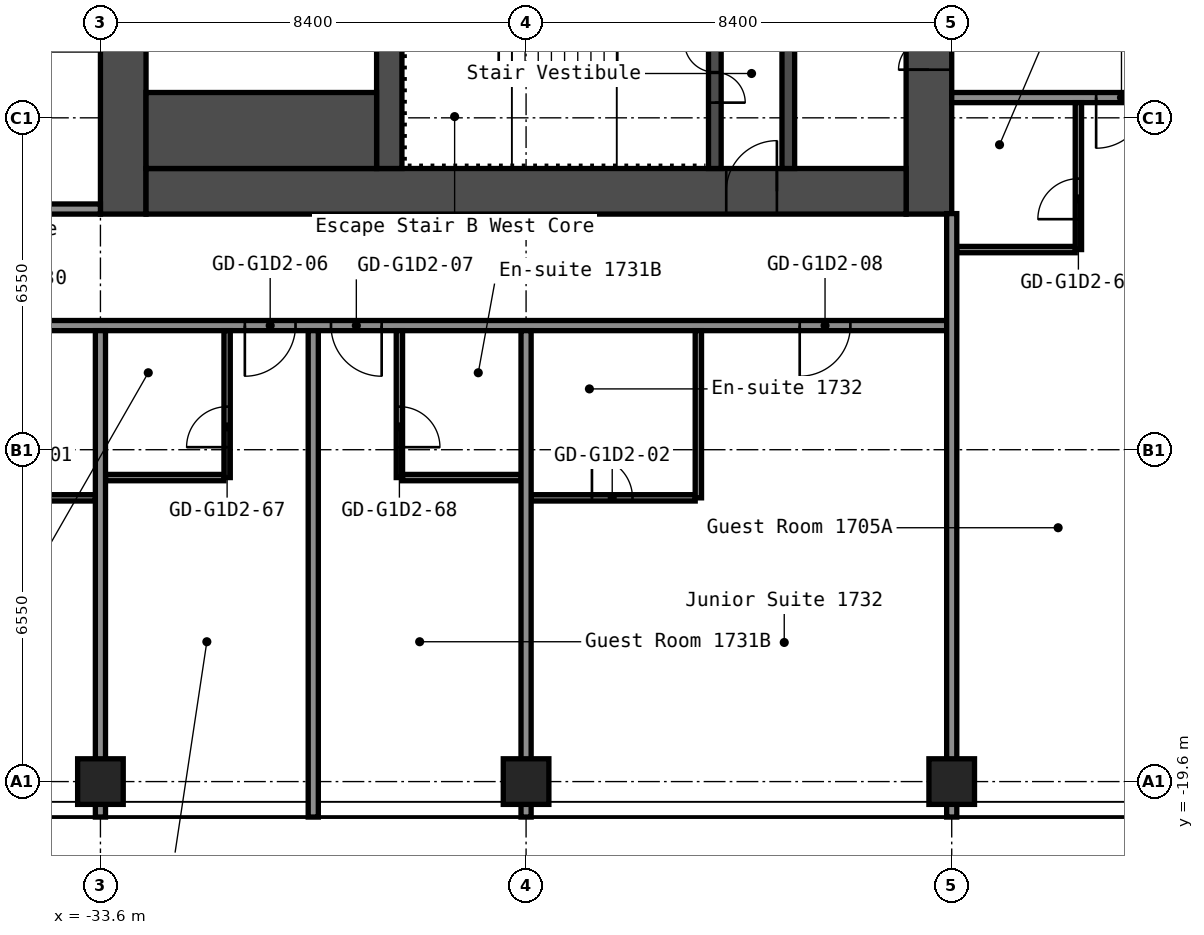
"""IFC4 building model, lengths in metres.
Left out: names, types, materials, properties, quantities, classifications, styles, units other than length and angle.
Written with IfcOpenShell. Run it as: python <this file> out.ifc"""

import sys

from ifc_helpers import new_model, si_unit, direction, frame, frame_2d, origin, origin_2d, place, context, subcontext, project, spatial, rectangle, hollow_rectangle, extrude, element, fill, save


model = new_model("IFC4")
c1 = context("Model", 3, precision=1e-05, world=origin(), true_north=direction((0.0, 1.0)))
c2 = subcontext(c1, "Body", "Model", "MODEL_VIEW")
j1 = project(units=[si_unit("LENGTHUNIT", "METRE"), si_unit("PLANEANGLEUNIT", "RADIAN")], contexts=[c1])
p1 = place(None, origin())
s1 = spatial("IfcSite", under=j1, at=p1, CompositionType="ELEMENT")
p2 = place(p1, origin())
s2 = spatial("IfcBuilding", under=s1, at=p2, CompositionType="ELEMENT")
p3 = place(p2, frame((0.0, 0.0, 61.4)))
s3 = spatial("IfcBuildingStorey", under=s2, at=p3, CompositionType="ELEMENT", Elevation=61.4)
for number, where, z_axis, x_axis in (
    (1, (-33.6, -19.6, 0.0), (0.0, 0.0, 1.0), (1.0, 0.0, 0.0)),
    (2, (-25.2, -19.6, 0.0), (0.0, 0.0, 1.0), (1.0, 0.0, 0.0)),
    (3, (-16.8, -19.6, 0.0), (0.0, 0.0, 1.0), (1.0, 0.0, 0.0)),
):
    element("IfcColumn", number, at=place(p3, frame(where, z_axis=z_axis, x_axis=x_axis)), inside=s3, PredefinedType="COLUMN", context=c2, shape_type="SweptSolid", body=[
        extrude(hollow_rectangle(XDim=0.9, YDim=0.9, WallThickness=0.036, at=origin_2d()), origin(), (0.0, 0.0, 1.0), 2.9),
    ])
p4 = place(p3, frame((-17.25, -8.4, 0.0), z_axis=(0.0, 0.0, 1.0), x_axis=(0.0, 1.0, 0.0)))
e4 = element("IfcWall", 4, at=p4, inside=s3, PredefinedType="SHEAR", context=c2, shape_type="SweptSolid", body=[
    extrude(rectangle(XDim=16.8, YDim=0.9, at=frame_2d((8.4, 0.0))), origin(), (0.0, 0.0, 1.0), 2.9),
])
p5 = place(p4, frame((12.75, 0.0, 0.0)))
e5 = element("IfcOpeningElement", 5, at=p5, cuts=e4, PredefinedType="OPENING", context=c2, shape_type="SweptSolid", body=[
    extrude(rectangle(XDim=1.2, YDim=2.1, at=frame_2d((0.6, 1.05))), frame((0.0, 0.46, 0.0), z_axis=(0.0, -1.0, 0.0), x_axis=(1.0, 0.0, 0.0)), (0.0, 0.0, 1.0), 0.92),
])
p6 = place(p4, frame((2.85, 0.0, 0.0)))
e6 = element("IfcOpeningElement", 6, at=p6, cuts=e4, PredefinedType="OPENING", context=c2, shape_type="SweptSolid", body=[
    extrude(rectangle(XDim=1.2, YDim=2.1, at=frame_2d((0.6, 1.05))), frame((0.0, 0.46, 0.0), z_axis=(0.0, -1.0, 0.0), x_axis=(1.0, 0.0, 0.0)), (0.0, 0.0, 1.0), 0.92),
])
p7 = place(p3, frame((-33.15, -8.4, 0.0), z_axis=(0.0, 0.0, 1.0), x_axis=(0.0, 1.0, 0.0)))
e7 = element("IfcWall", 7, at=p7, inside=s3, PredefinedType="SHEAR", context=c2, shape_type="SweptSolid", body=[
    extrude(rectangle(XDim=16.8, YDim=0.9, at=frame_2d((8.4, 0.0))), origin(), (0.0, 0.0, 1.0), 2.9),
])
p8 = place(p3, frame((-32.7, -7.95, 0.0), z_axis=(0.0, 0.0, 1.0), x_axis=(1.0, 0.0, 0.0)))
e8 = element("IfcWall", 8, at=p8, inside=s3, PredefinedType="SHEAR", context=c2, shape_type="SweptSolid", body=[
    extrude(rectangle(XDim=15.0, YDim=0.9, at=frame_2d((7.5, 0.0))), origin(), (0.0, 0.0, 1.0), 2.9),
])
p9 = place(p8, frame((11.45, 0.0, 0.0)))
e9 = element("IfcOpeningElement", 9, at=p9, cuts=e8, PredefinedType="OPENING", context=c2, shape_type="SweptSolid", body=[
    extrude(rectangle(XDim=1.0, YDim=2.1, at=frame_2d((0.5, 1.05))), frame((0.0, 0.46, 0.0), z_axis=(0.0, -1.0, 0.0), x_axis=(1.0, 0.0, 0.0)), (0.0, 0.0, 1.0), 0.92),
])
p10 = place(p3, frame((-20.025, -7.5, 0.0), z_axis=(0.0, 0.0, 1.0), x_axis=(0.0, 1.0, 0.0)))
e10 = element("IfcWall", 10, at=p10, inside=s3, PredefinedType="SHEAR", context=c2, shape_type="SweptSolid", body=[
    extrude(rectangle(XDim=6.3, YDim=0.25, at=frame_2d((3.15, 0.0))), origin(), (0.0, 0.0, 1.0), 2.9),
])
p11 = place(p10, frame((2.4, 0.0, 0.0)))
e11 = element("IfcOpeningElement", 11, at=p11, cuts=e10, PredefinedType="OPENING", context=c2, shape_type="SweptSolid", body=[
    extrude(rectangle(XDim=1.0, YDim=2.1, at=frame_2d((0.5, 1.05))), frame((0.0, 0.135, 0.0), z_axis=(0.0, -1.0, 0.0), x_axis=(1.0, 0.0, 0.0)), (0.0, 0.0, 1.0), 0.27),
])
p12 = place(p3, frame((-21.475, -7.5, 0.0), z_axis=(0.0, 0.0, 1.0), x_axis=(0.0, 1.0, 0.0)))
e12 = element("IfcWall", 12, at=p12, inside=s3, PredefinedType="SHEAR", context=c2, shape_type="SweptSolid", body=[
    extrude(rectangle(XDim=3.75, YDim=0.25, at=frame_2d((1.875, 0.0))), origin(), (0.0, 0.0, 1.0), 2.9),
])
p13 = place(p12, frame((1.3, 0.0, 0.0)))
e13 = element("IfcOpeningElement", 13, at=p13, cuts=e12, PredefinedType="OPENING", context=c2, shape_type="SweptSolid", body=[
    extrude(rectangle(XDim=1.2, YDim=2.1, at=frame_2d((0.6, 1.05))), frame((0.0, 0.135, 0.0), z_axis=(0.0, -1.0, 0.0), x_axis=(1.0, 0.0, 0.0)), (0.0, 0.0, 1.0), 0.27),
])
p14 = place(p3, frame((-27.9, -7.5, 0.0), z_axis=(0.0, 0.0, 1.0), x_axis=(0.0, 1.0, 0.0)))
e14 = element("IfcWall", 14, at=p14, inside=s3, PredefinedType="SHEAR", context=c2, shape_type="SweptSolid", body=[
    extrude(rectangle(XDim=3.75, YDim=0.5, at=frame_2d((1.875, 0.0))), origin(), (0.0, 0.0, 1.0), 2.9),
])
p15 = place(p3, frame((-32.7, -6.75, 0.0), z_axis=(0.0, 0.0, 1.0), x_axis=(1.0, 0.0, 0.0)))
e15 = element("IfcWall", 15, at=p15, inside=s3, PredefinedType="SHEAR", context=c2, shape_type="SweptSolid", body=[
    extrude(rectangle(XDim=4.55, YDim=1.5, at=frame_2d((2.275, 0.0))), origin(), (0.0, 0.0, 1.0), 2.9),
])
p16 = place(p3, frame((-36.938, -14.0, 0.0), z_axis=(0.0, 0.0, 1.0), x_axis=(1.0, 0.0, 0.0)))
e16 = element("IfcWall", 16, at=p16, inside=s3, PredefinedType="PARTITIONING", context=c2, shape_type="SweptSolid", body=[
    extrude(rectangle(XDim=3.238, YDim=0.125, at=frame_2d((1.619, 0.0))), origin(), (0.0, 0.0, 1.0), 2.9),
])
p17 = place(p16, frame((1.238, 0.0, 0.0)))
e17 = element("IfcOpeningElement", 17, at=p17, cuts=e16, PredefinedType="OPENING", context=c2, shape_type="SweptSolid", body=[
    extrude(rectangle(XDim=0.8, YDim=2.1, at=frame_2d((0.4, 1.05))), frame((0.0, 0.073, 0.0), z_axis=(0.0, -1.0, 0.0), x_axis=(1.0, 0.0, 0.0)), (0.0, 0.0, 1.0), 0.145),
])
p18 = place(p3, frame((-25.1, -14.0, 0.0), z_axis=(0.0, 0.0, 1.0), x_axis=(1.0, 0.0, 0.0)))
e18 = element("IfcWall", 18, at=p18, inside=s3, PredefinedType="PARTITIONING", context=c2, shape_type="SweptSolid", body=[
    extrude(rectangle(XDim=3.238, YDim=0.125, at=frame_2d((1.619, 0.0))), origin(), (0.0, 0.0, 1.0), 2.9),
])
p19 = place(p18, frame((1.2, 0.0, 0.0)))
e19 = element("IfcOpeningElement", 19, at=p19, cuts=e18, PredefinedType="OPENING", context=c2, shape_type="SweptSolid", body=[
    extrude(rectangle(XDim=0.8, YDim=2.1, at=frame_2d((0.4, 1.05))), frame((0.0, 0.073, 0.0), z_axis=(0.0, -1.0, 0.0), x_axis=(1.0, 0.0, 0.0)), (0.0, 0.0, 1.0), 0.145),
])
for number, where, z_axis, x_axis in (
    (20, (-33.5, -13.6, 0.0), (0.0, 0.0, 1.0), (1.0, 0.0, 0.0)),
    (21, (-27.637, -13.6, 0.0), (0.0, 0.0, 1.0), (1.0, 0.0, 0.0)),
):
    element("IfcWall", number, at=place(p3, frame(where, z_axis=z_axis, x_axis=x_axis)), inside=s3, PredefinedType="PARTITIONING", context=c2, shape_type="SweptSolid", body=[
        extrude(rectangle(XDim=2.337, YDim=0.125, at=frame_2d((1.169, 0.0))), origin(), (0.0, 0.0, 1.0), 2.9),
    ])
p20 = place(p3, frame((-51.1, -10.6, 0.0), z_axis=(0.0, 0.0, 1.0), x_axis=(1.0, 0.0, 0.0)))
e22 = element("IfcWall", 22, at=p20, inside=s3, PredefinedType="PARTITIONING", context=c2, shape_type="SweptSolid", body=[
    extrude(rectangle(XDim=34.3, YDim=0.2, at=frame_2d((17.15, 0.0))), origin(), (0.0, 0.0, 1.0), 2.9),
])
p21 = place(p20, frame((3.25, 0.0, 0.0)))
e23 = element("IfcOpeningElement", 23, at=p21, cuts=e22, PredefinedType="OPENING", context=c2, shape_type="SweptSolid", body=[
    extrude(rectangle(XDim=1.0, YDim=2.1, at=frame_2d((0.5, 1.05))), frame((0.0, 0.11, 0.0), z_axis=(0.0, -1.0, 0.0), x_axis=(1.0, 0.0, 0.0)), (0.0, 0.0, 1.0), 0.22),
])
p22 = place(p20, frame((5.15, 0.0, 0.0)))
e24 = element("IfcOpeningElement", 24, at=p22, cuts=e22, PredefinedType="OPENING", context=c2, shape_type="SweptSolid", body=[
    extrude(rectangle(XDim=1.0, YDim=2.1, at=frame_2d((0.5, 1.05))), frame((0.0, 0.11, 0.0), z_axis=(0.0, -1.0, 0.0), x_axis=(1.0, 0.0, 0.0)), (0.0, 0.0, 1.0), 0.22),
])
p23 = place(p20, frame((11.1, 0.0, 0.0)))
e25 = element("IfcOpeningElement", 25, at=p23, cuts=e22, PredefinedType="OPENING", context=c2, shape_type="SweptSolid", body=[
    extrude(rectangle(XDim=1.0, YDim=2.1, at=frame_2d((0.5, 1.05))), frame((0.0, 0.11, 0.0), z_axis=(0.0, -1.0, 0.0), x_axis=(1.0, 0.0, 0.0)), (0.0, 0.0, 1.0), 0.22),
])
p24 = place(p20, frame((20.35, 0.0, 0.0)))
e26 = element("IfcOpeningElement", 26, at=p24, cuts=e22, PredefinedType="OPENING", context=c2, shape_type="SweptSolid", body=[
    extrude(rectangle(XDim=1.0, YDim=2.1, at=frame_2d((0.5, 1.05))), frame((0.0, 0.11, 0.0), z_axis=(0.0, -1.0, 0.0), x_axis=(1.0, 0.0, 0.0)), (0.0, 0.0, 1.0), 0.22),
])
p25 = place(p20, frame((22.05, 0.0, 0.0)))
e27 = element("IfcOpeningElement", 27, at=p25, cuts=e22, PredefinedType="OPENING", context=c2, shape_type="SweptSolid", body=[
    extrude(rectangle(XDim=1.0, YDim=2.1, at=frame_2d((0.5, 1.05))), frame((0.0, 0.11, 0.0), z_axis=(0.0, -1.0, 0.0), x_axis=(1.0, 0.0, 0.0)), (0.0, 0.0, 1.0), 0.22),
])
p26 = place(p20, frame((31.3, 0.0, 0.0)))
e28 = element("IfcOpeningElement", 28, at=p26, cuts=e22, PredefinedType="OPENING", context=c2, shape_type="SweptSolid", body=[
    extrude(rectangle(XDim=1.0, YDim=2.1, at=frame_2d((0.5, 1.05))), frame((0.0, 0.11, 0.0), z_axis=(0.0, -1.0, 0.0), x_axis=(1.0, 0.0, 0.0)), (0.0, 0.0, 1.0), 0.22),
])
p27 = place(p3, frame((-16.7, -9.1, 0.0), z_axis=(0.0, 0.0, 1.0), x_axis=(1.0, 0.0, 0.0)))
e29 = element("IfcWall", 29, at=p27, inside=s3, PredefinedType="PARTITIONING", context=c2, shape_type="SweptSolid", body=[
    extrude(rectangle(XDim=2.337, YDim=0.125, at=frame_2d((1.169, 0.0))), origin(), (0.0, 0.0, 1.0), 2.9),
])
p28 = place(p3, frame((-48.6, -8.3, 0.0), z_axis=(0.0, 0.0, 1.0), x_axis=(1.0, 0.0, 0.0)))
e30 = element("IfcWall", 30, at=p28, inside=s3, PredefinedType="PARTITIONING", context=c2, shape_type="SweptSolid", body=[
    extrude(rectangle(XDim=15.0, YDim=0.2, at=frame_2d((7.5, 0.0))), origin(), (0.0, 0.0, 1.0), 2.9),
])
p29 = place(p28, frame((1.1, 0.0, 0.0)))
e31 = element("IfcOpeningElement", 31, at=p29, cuts=e30, PredefinedType="OPENING", context=c2, shape_type="SweptSolid", body=[
    extrude(rectangle(XDim=1.0, YDim=2.1, at=frame_2d((0.5, 1.05))), frame((0.0, 0.11, 0.0), z_axis=(0.0, -1.0, 0.0), x_axis=(1.0, 0.0, 0.0)), (0.0, 0.0, 1.0), 0.22),
])
p30 = place(p28, frame((8.2, 0.0, 0.0)))
e32 = element("IfcOpeningElement", 32, at=p30, cuts=e30, PredefinedType="OPENING", context=c2, shape_type="SweptSolid", body=[
    extrude(rectangle(XDim=1.0, YDim=2.1, at=frame_2d((0.5, 1.05))), frame((0.0, 0.11, 0.0), z_axis=(0.0, -1.0, 0.0), x_axis=(1.0, 0.0, 0.0)), (0.0, 0.0, 1.0), 0.22),
])
p31 = place(p3, frame((-16.8, -6.1, 0.0), z_axis=(0.0, 0.0, 1.0), x_axis=(1.0, 0.0, 0.0)))
e33 = element("IfcWall", 33, at=p31, inside=s3, PredefinedType="PARTITIONING", context=c2, shape_type="SweptSolid", body=[
    extrude(rectangle(XDim=33.6, YDim=0.2, at=frame_2d((16.8, 0.0))), origin(), (0.0, 0.0, 1.0), 2.9),
])
p32 = place(p31, frame((2.85, 0.0, 0.0)))
e34 = element("IfcOpeningElement", 34, at=p32, cuts=e33, PredefinedType="OPENING", context=c2, shape_type="SweptSolid", body=[
    extrude(rectangle(XDim=1.0, YDim=2.1, at=frame_2d((0.5, 1.05))), frame((0.0, 0.11, 0.0), z_axis=(0.0, -1.0, 0.0), x_axis=(1.0, 0.0, 0.0)), (0.0, 0.0, 1.0), 0.22),
])
p33 = place(p31, frame((4.55, 0.0, 0.0)))
e35 = element("IfcOpeningElement", 35, at=p33, cuts=e33, PredefinedType="OPENING", context=c2, shape_type="SweptSolid", body=[
    extrude(rectangle(XDim=1.0, YDim=2.1, at=frame_2d((0.5, 1.05))), frame((0.0, 0.11, 0.0), z_axis=(0.0, -1.0, 0.0), x_axis=(1.0, 0.0, 0.0)), (0.0, 0.0, 1.0), 0.22),
])
p34 = place(p31, frame((12.1, 0.0, 0.0)))
e36 = element("IfcOpeningElement", 36, at=p34, cuts=e33, PredefinedType="OPENING", context=c2, shape_type="SweptSolid", body=[
    extrude(rectangle(XDim=1.0, YDim=2.1, at=frame_2d((0.5, 1.05))), frame((0.0, 0.11, 0.0), z_axis=(0.0, -1.0, 0.0), x_axis=(1.0, 0.0, 0.0)), (0.0, 0.0, 1.0), 0.22),
])
p35 = place(p31, frame((19.65, 0.0, 0.0)))
e37 = element("IfcOpeningElement", 37, at=p35, cuts=e33, PredefinedType="OPENING", context=c2, shape_type="SweptSolid", body=[
    extrude(rectangle(XDim=1.0, YDim=2.1, at=frame_2d((0.5, 1.05))), frame((0.0, 0.11, 0.0), z_axis=(0.0, -1.0, 0.0), x_axis=(1.0, 0.0, 0.0)), (0.0, 0.0, 1.0), 0.22),
])
p36 = place(p31, frame((21.35, 0.0, 0.0)))
e38 = element("IfcOpeningElement", 38, at=p36, cuts=e33, PredefinedType="OPENING", context=c2, shape_type="SweptSolid", body=[
    extrude(rectangle(XDim=1.0, YDim=2.1, at=frame_2d((0.5, 1.05))), frame((0.0, 0.11, 0.0), z_axis=(0.0, -1.0, 0.0), x_axis=(1.0, 0.0, 0.0)), (0.0, 0.0, 1.0), 0.22),
])
p37 = place(p31, frame((30.6, 0.0, 0.0)))
e39 = element("IfcOpeningElement", 39, at=p37, cuts=e33, PredefinedType="OPENING", context=c2, shape_type="SweptSolid", body=[
    extrude(rectangle(XDim=1.0, YDim=2.1, at=frame_2d((0.5, 1.05))), frame((0.0, 0.11, 0.0), z_axis=(0.0, -1.0, 0.0), x_axis=(1.0, 0.0, 0.0)), (0.0, 0.0, 1.0), 0.22),
])
p38 = place(p3, frame((-33.6, -20.3, 0.0), z_axis=(0.0, 0.0, 1.0), x_axis=(0.0, 1.0, 0.0)))
e40 = element("IfcWall", 40, at=p38, inside=s3, PredefinedType="PARTITIONING", context=c2, shape_type="SweptSolid", body=[
    extrude(rectangle(XDim=9.6, YDim=0.2, at=frame_2d((4.8, 0.0))), origin(), (0.0, 0.0, 1.0), 2.9),
])
p39 = place(p3, frame((-31.1, -13.6, 0.0), z_axis=(0.0, 0.0, 1.0), x_axis=(0.0, 1.0, 0.0)))
e41 = element("IfcWall", 41, at=p39, inside=s3, PredefinedType="PARTITIONING", context=c2, shape_type="SweptSolid", body=[
    extrude(rectangle(XDim=2.9, YDim=0.125, at=frame_2d((1.45, 0.0))), origin(), (0.0, 0.0, 1.0), 2.9),
])
p40 = place(p39, frame((0.6, 0.0, 0.0)))
e42 = element("IfcOpeningElement", 42, at=p40, cuts=e41, PredefinedType="OPENING", context=c2, shape_type="SweptSolid", body=[
    extrude(rectangle(XDim=0.8, YDim=2.1, at=frame_2d((0.4, 1.05))), frame((0.0, 0.073, 0.0), z_axis=(0.0, -1.0, 0.0), x_axis=(1.0, 0.0, 0.0)), (0.0, 0.0, 1.0), 0.145),
])
p41 = place(p3, frame((-29.4, -20.3, 0.0), z_axis=(0.0, 0.0, 1.0), x_axis=(0.0, 1.0, 0.0)))
e43 = element("IfcWall", 43, at=p41, inside=s3, PredefinedType="PARTITIONING", context=c2, shape_type="SweptSolid", body=[
    extrude(rectangle(XDim=9.6, YDim=0.2, at=frame_2d((4.8, 0.0))), origin(), (0.0, 0.0, 1.0), 2.9),
])
p42 = place(p3, frame((-27.7, -13.6, 0.0), z_axis=(0.0, 0.0, 1.0), x_axis=(0.0, 1.0, 0.0)))
e44 = element("IfcWall", 44, at=p42, inside=s3, PredefinedType="PARTITIONING", context=c2, shape_type="SweptSolid", body=[
    extrude(rectangle(XDim=2.9, YDim=0.125, at=frame_2d((1.45, 0.0))), origin(), (0.0, 0.0, 1.0), 2.9),
])
p43 = place(p42, frame((0.6, 0.0, 0.0)))
e45 = element("IfcOpeningElement", 45, at=p43, cuts=e44, PredefinedType="OPENING", context=c2, shape_type="SweptSolid", body=[
    extrude(rectangle(XDim=0.8, YDim=2.1, at=frame_2d((0.4, 1.05))), frame((0.0, 0.073, 0.0), z_axis=(0.0, -1.0, 0.0), x_axis=(1.0, 0.0, 0.0)), (0.0, 0.0, 1.0), 0.145),
])
p44 = place(p3, frame((-25.2, -20.3, 0.0), z_axis=(0.0, 0.0, 1.0), x_axis=(0.0, 1.0, 0.0)))
e46 = element("IfcWall", 46, at=p44, inside=s3, PredefinedType="PARTITIONING", context=c2, shape_type="SweptSolid", body=[
    extrude(rectangle(XDim=9.6, YDim=0.2, at=frame_2d((4.8, 0.0))), origin(), (0.0, 0.0, 1.0), 2.9),
])
p45 = place(p3, frame((-21.8, -14.0, 0.0), z_axis=(0.0, 0.0, 1.0), x_axis=(0.0, 1.0, 0.0)))
e47 = element("IfcWall", 47, at=p45, inside=s3, PredefinedType="PARTITIONING", context=c2, shape_type="SweptSolid", body=[
    extrude(rectangle(XDim=3.3, YDim=0.125, at=frame_2d((1.65, 0.0))), origin(), (0.0, 0.0, 1.0), 2.9),
])
p46 = place(p3, frame((-16.8, -20.3, 0.0), z_axis=(0.0, 0.0, 1.0), x_axis=(0.0, 1.0, 0.0)))
e48 = element("IfcWall", 48, at=p46, inside=s3, PredefinedType="PARTITIONING", context=c2, shape_type="SweptSolid", body=[
    extrude(rectangle(XDim=11.91, YDim=0.2, at=frame_2d((5.955, 0.0))), origin(), (0.0, 0.0, 1.0), 2.9),
])
p47 = place(p3, frame((-14.3, -9.1, 0.0), z_axis=(0.0, 0.0, 1.0), x_axis=(0.0, 1.0, 0.0)))
e49 = element("IfcWall", 49, at=p47, inside=s3, PredefinedType="PARTITIONING", context=c2, shape_type="SweptSolid", body=[
    extrude(rectangle(XDim=2.9, YDim=0.125, at=frame_2d((1.45, 0.0))), origin(), (0.0, 0.0, 1.0), 2.9),
])
p48 = place(p47, frame((0.6, 0.0, 0.0)))
e50 = element("IfcOpeningElement", 50, at=p48, cuts=e49, PredefinedType="OPENING", context=c2, shape_type="SweptSolid", body=[
    extrude(rectangle(XDim=0.8, YDim=2.1, at=frame_2d((0.4, 1.05))), frame((0.0, 0.073, 0.0), z_axis=(0.0, -1.0, 0.0), x_axis=(1.0, 0.0, 0.0)), (0.0, 0.0, 1.0), 0.145),
])
p49 = place(p6, origin())
e51 = element("IfcDoor", 51, at=p49, inside=s3, OperationType="DOUBLE_DOOR_SINGLE_SWING", PredefinedType="DOOR", context=c2, shape_type="SweptSolid", body=[
    extrude(rectangle(XDim=1.2, YDim=2.1, at=frame_2d((0.6, 1.05))), frame((0.0, 0.025, 0.0), z_axis=(0.0, -1.0, 0.0), x_axis=(1.0, 0.0, 0.0)), (0.0, 0.0, 1.0), 0.05),
])
fill(e6, e51)
p50 = place(p9, origin())
e52 = element("IfcDoor", 52, at=p50, inside=s3, OperationType="SINGLE_SWING_LEFT", PredefinedType="DOOR", context=c2, shape_type="SweptSolid", body=[
    extrude(rectangle(XDim=1.0, YDim=2.1, at=frame_2d((0.5, 1.05))), frame((0.0, 0.025, 0.0), z_axis=(0.0, -1.0, 0.0), x_axis=(1.0, 0.0, 0.0)), (0.0, 0.0, 1.0), 0.05),
])
fill(e9, e52)
p51 = place(p13, origin())
e53 = element("IfcDoor", 53, at=p51, inside=s3, OperationType="DOUBLE_DOOR_SINGLE_SWING", PredefinedType="DOOR", context=c2, shape_type="SweptSolid", body=[
    extrude(rectangle(XDim=1.2, YDim=2.1, at=frame_2d((0.6, 1.05))), frame((0.0, 0.025, 0.0), z_axis=(0.0, -1.0, 0.0), x_axis=(1.0, 0.0, 0.0)), (0.0, 0.0, 1.0), 0.05),
])
fill(e13, e53)
p52 = place(p19, origin())
e54 = element("IfcDoor", 54, at=p52, inside=s3, OperationType="SINGLE_SWING_RIGHT", PredefinedType="DOOR", context=c2, shape_type="SweptSolid", body=[
    extrude(rectangle(XDim=0.8, YDim=2.1, at=frame_2d((0.4, 1.05))), frame((0.0, 0.025, 0.0), z_axis=(0.0, -1.0, 0.0), x_axis=(1.0, 0.0, 0.0)), (0.0, 0.0, 1.0), 0.05),
])
fill(e19, e54)
p53 = place(p24, origin())
e55 = element("IfcDoor", 55, at=p53, inside=s3, OperationType="SINGLE_SWING_LEFT", PredefinedType="DOOR", context=c2, shape_type="SweptSolid", body=[
    extrude(rectangle(XDim=1.0, YDim=2.1, at=frame_2d((0.5, 1.05))), frame((0.0, 0.025, 0.0), z_axis=(0.0, -1.0, 0.0), x_axis=(1.0, 0.0, 0.0)), (0.0, 0.0, 1.0), 0.05),
])
fill(e26, e55)
p54 = place(p25, origin())
e56 = element("IfcDoor", 56, at=p54, inside=s3, OperationType="SINGLE_SWING_RIGHT", PredefinedType="DOOR", context=c2, shape_type="SweptSolid", body=[
    extrude(rectangle(XDim=1.0, YDim=2.1, at=frame_2d((0.5, 1.05))), frame((0.0, 0.025, 0.0), z_axis=(0.0, -1.0, 0.0), x_axis=(1.0, 0.0, 0.0)), (0.0, 0.0, 1.0), 0.05),
])
fill(e27, e56)
p55 = place(p26, origin())
e57 = element("IfcDoor", 57, at=p55, inside=s3, OperationType="SINGLE_SWING_LEFT", PredefinedType="DOOR", context=c2, shape_type="SweptSolid", body=[
    extrude(rectangle(XDim=1.0, YDim=2.1, at=frame_2d((0.5, 1.05))), frame((0.0, 0.025, 0.0), z_axis=(0.0, -1.0, 0.0), x_axis=(1.0, 0.0, 0.0)), (0.0, 0.0, 1.0), 0.05),
])
fill(e28, e57)
p56 = place(p32, origin())
e58 = element("IfcDoor", 58, at=p56, inside=s3, OperationType="SINGLE_SWING_LEFT", PredefinedType="DOOR", context=c2, shape_type="SweptSolid", body=[
    extrude(rectangle(XDim=1.0, YDim=2.1, at=frame_2d((0.5, 1.05))), frame((0.0, 0.025, 0.0), z_axis=(0.0, -1.0, 0.0), x_axis=(1.0, 0.0, 0.0)), (0.0, 0.0, 1.0), 0.05),
])
fill(e34, e58)
p57 = place(p40, origin())
e59 = element("IfcDoor", 59, at=p57, inside=s3, OperationType="SINGLE_SWING_RIGHT", PredefinedType="DOOR", context=c2, shape_type="SweptSolid", body=[
    extrude(rectangle(XDim=0.8, YDim=2.1, at=frame_2d((0.4, 1.05))), frame((0.0, 0.025, 0.0), z_axis=(0.0, -1.0, 0.0), x_axis=(1.0, 0.0, 0.0)), (0.0, 0.0, 1.0), 0.05),
])
fill(e42, e59)
p58 = place(p43, origin())
e60 = element("IfcDoor", 60, at=p58, inside=s3, OperationType="SINGLE_SWING_LEFT", PredefinedType="DOOR", context=c2, shape_type="SweptSolid", body=[
    extrude(rectangle(XDim=0.8, YDim=2.1, at=frame_2d((0.4, 1.05))), frame((0.0, 0.025, 0.0), z_axis=(0.0, -1.0, 0.0), x_axis=(1.0, 0.0, 0.0)), (0.0, 0.0, 1.0), 0.05),
])
fill(e45, e60)
p59 = place(p48, origin())
e61 = element("IfcDoor", 61, at=p59, inside=s3, OperationType="SINGLE_SWING_RIGHT", PredefinedType="DOOR", context=c2, shape_type="SweptSolid", body=[
    extrude(rectangle(XDim=0.8, YDim=2.1, at=frame_2d((0.4, 1.05))), frame((0.0, 0.025, 0.0), z_axis=(0.0, -1.0, 0.0), x_axis=(1.0, 0.0, 0.0)), (0.0, 0.0, 1.0), 0.05),
])
fill(e50, e61)
save(model, sys.argv[1])
